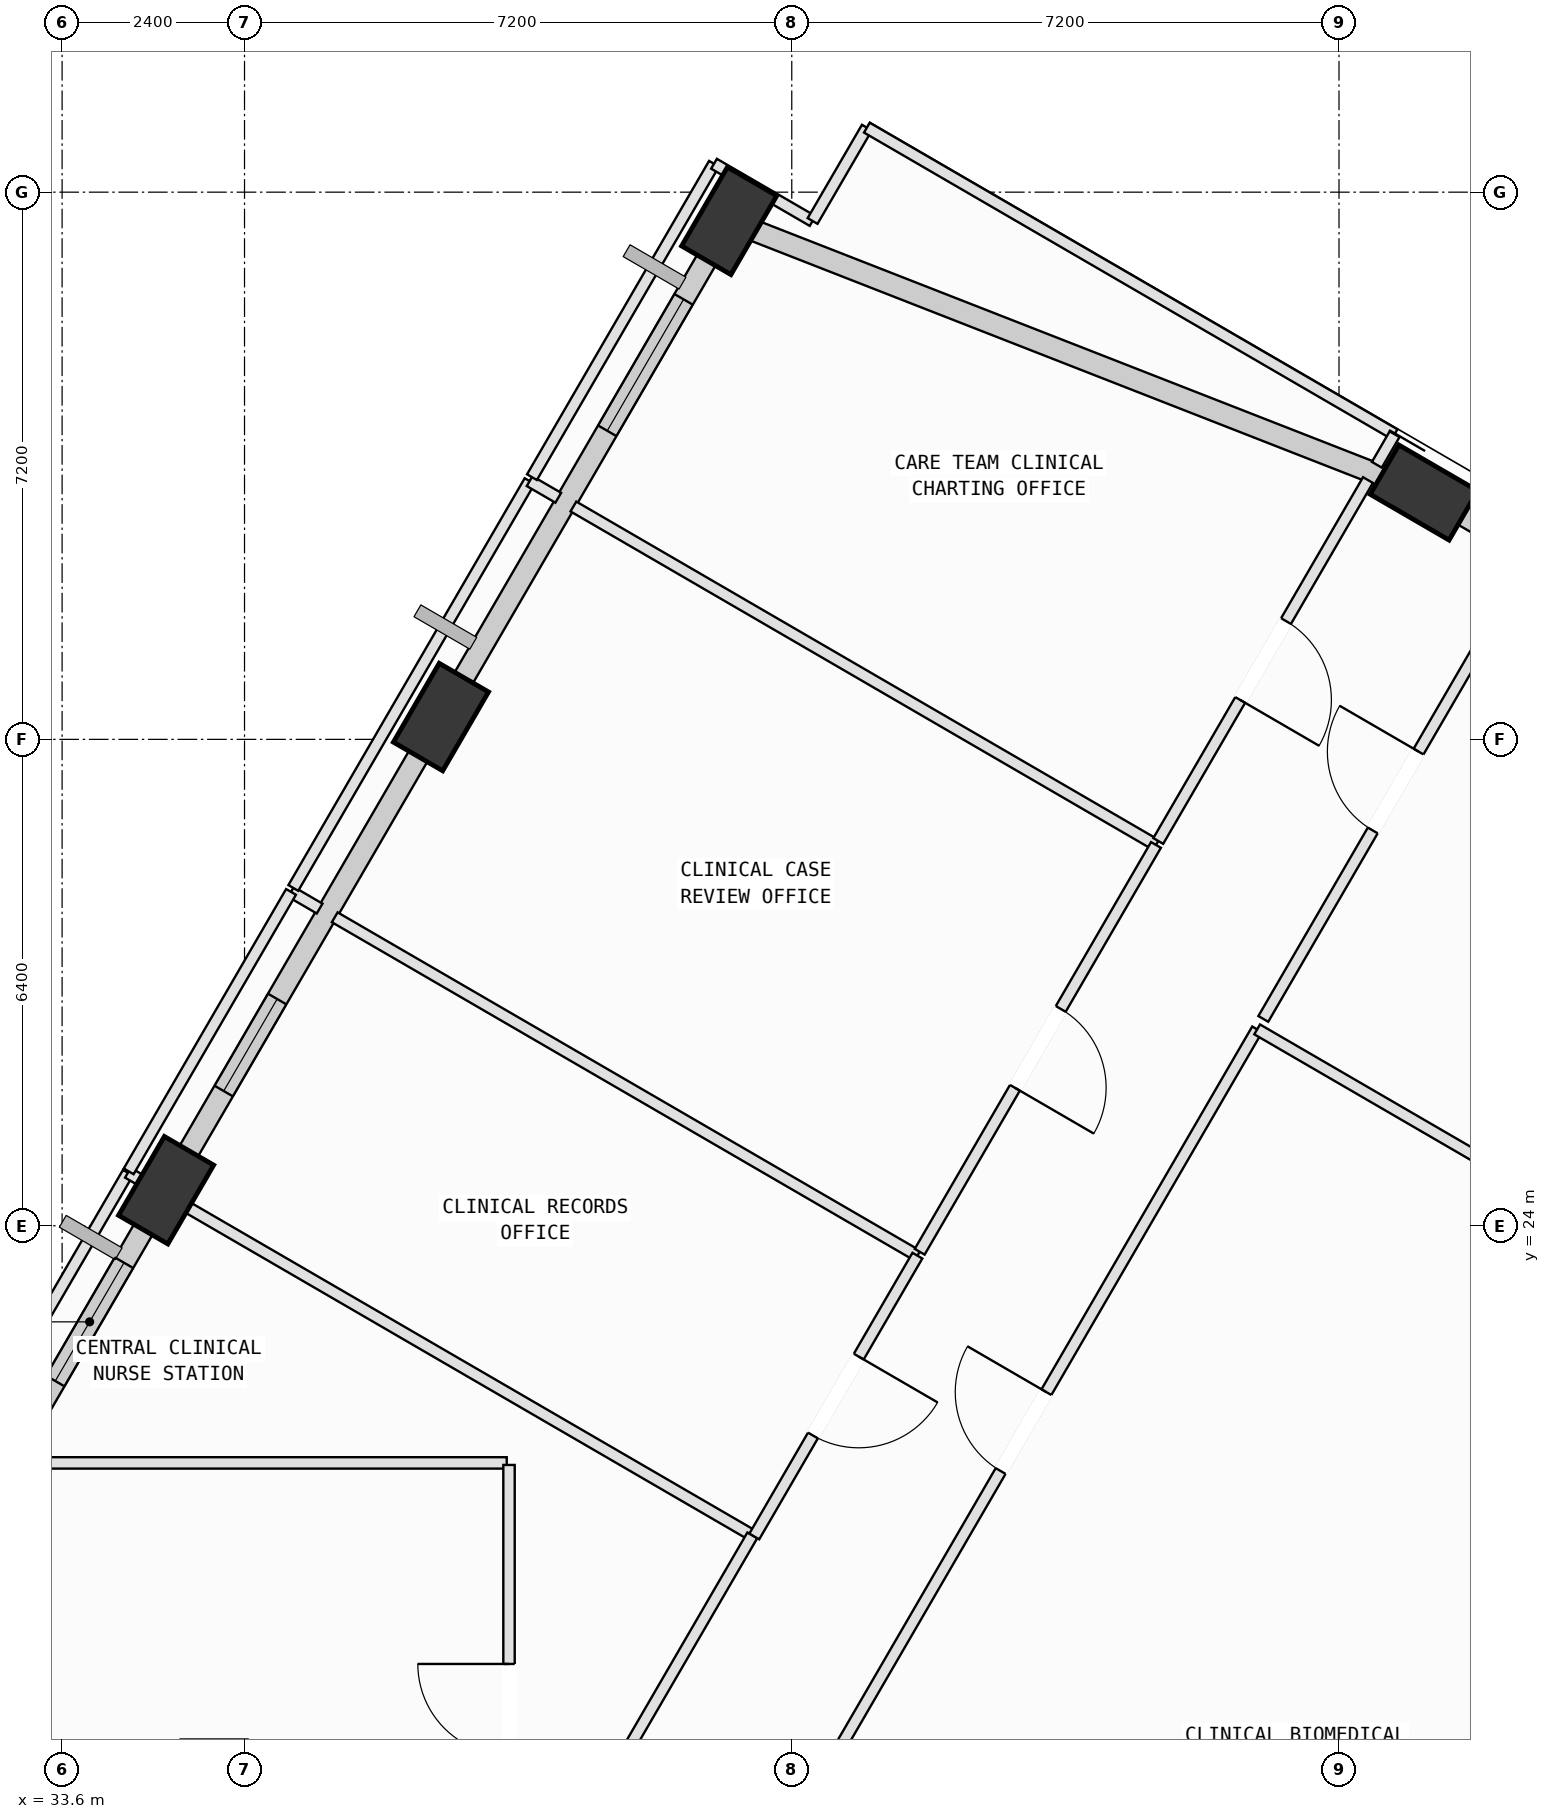
"""IFC4 building model, lengths in metres.
Left out: names, types, materials, properties, quantities, classifications, styles, units other than length and angle.
Written with IfcOpenShell. Run it as: python <this file> out.ifc"""

import sys

from ifc_helpers import new_model, si_unit, direction, frame, frame_2d, origin, origin_2d, place, context, subcontext, project, spatial, rectangle, extrude, element, fill, save


model = new_model("IFC4")
c1 = context("Model", 3, precision=1e-05, world=origin(), true_north=direction((0.0, 1.0)))
c2 = subcontext(c1, "Body", "Model", "MODEL_VIEW")
j1 = project(units=[si_unit("LENGTHUNIT", "METRE"), si_unit("PLANEANGLEUNIT", "RADIAN")], contexts=[c1])
p1 = place(None, origin())
s1 = spatial("IfcSite", under=j1, at=p1, CompositionType="ELEMENT")
p2 = place(p1, origin())
s2 = spatial("IfcBuilding", under=s1, at=p2, CompositionType="ELEMENT")
p3 = place(p2, frame((0.0, 0.0, 280.6)))
s3 = spatial("IfcBuildingStorey", under=s2, at=p3, CompositionType="ELEMENT", Elevation=280.6)
p4 = place(p3, frame((51.518, 33.647, 0.002), z_axis=(-0.037199158282, 0.07372860995, 0.996584323927), x_axis=(0.997490610235, -0.057376614937, 0.041477783832)))
e1 = element("IfcColumn", 1, at=p4, inside=s3, PredefinedType="COLUMN", context=c2, shape_type="SweptSolid", body=[
    extrude(rectangle(XDim=1.2, YDim=0.75, at=origin_2d()), origin(), (0.0, 0.0, 1.0), 4.01),
])
p5 = place(p3, frame((42.377, 37.222, 0.002), z_axis=(-0.051702493642, 0.035911283909, 0.998016649079), x_axis=(0.422270840945, -0.904833829435, 0.054434162054)))
e2 = element("IfcColumn", 2, at=p5, inside=s3, PredefinedType="COLUMN", context=c2, shape_type="SweptSolid", body=[
    extrude(rectangle(XDim=1.2, YDim=0.75, at=origin_2d()), origin(), (0.0, 0.0, 1.0), 4.004),
])
p6 = place(p3, frame((38.584, 30.694, 0.002), z_axis=(-0.02454607751, 0.020455064592, 0.999489409855), x_axis=(0.34240952638, -0.939144474892, 0.027629178856)))
e3 = element("IfcColumn", 3, at=p6, inside=s3, PredefinedType="COLUMN", context=c2, shape_type="SweptSolid", body=[
    extrude(rectangle(XDim=1.2, YDim=0.75, at=origin_2d()), origin(), (0.0, 0.0, 1.0), 3.998),
])
p7 = place(p3, frame((34.968, 24.468, 0.002), z_axis=(0.001343981005, 0.005681374248, 0.999982957706), x_axis=(-0.687834203859, -0.725850275313, 0.005048349202)))
e4 = element("IfcColumn", 4, at=p7, inside=s3, PredefinedType="COLUMN", context=c2, shape_type="SweptSolid", body=[
    extrude(rectangle(XDim=1.2, YDim=0.75, at=origin_2d()), origin(), (0.0, 0.0, 1.0), 3.996),
])
p8 = place(p3, frame((54.944, 17.246, 0.0), z_axis=(0.0, 0.0, 1.0), x_axis=(-0.50227800112, -0.864706198423, 0.0)))
e5 = element("IfcWall", 5, at=p8, inside=s3, PredefinedType="SOLIDWALL", context=c2, shape_type="SweptSolid", body=[
    extrude(rectangle(XDim=6.407, YDim=0.28, at=frame_2d((3.203, 0.0))), origin(), (0.0, 0.0, 1.0), 3.265),
])
p9 = place(p8, frame((2.204, 0.0, 0.75)))
e6 = element("IfcOpeningElement", 6, at=p9, cuts=e5, PredefinedType="OPENING", context=c2, shape_type="SweptSolid", body=[
    extrude(rectangle(XDim=2.0, YDim=1.95, at=frame_2d((1.0, 0.975))), frame((0.0, 0.15, 0.0), z_axis=(0.0, -1.0, 0.0), x_axis=(1.0, 0.0, 0.0)), (0.0, 0.0, 1.0), 0.3),
])
p10 = place(p3, frame((51.732, 33.523, 0.0), z_axis=(0.0, 0.0, 1.0), x_axis=(0.864724875951, -0.502245845091, 0.0)))
e7 = element("IfcWall", 7, at=p10, inside=s3, PredefinedType="SOLIDWALL", context=c2, shape_type="SweptSolid", body=[
    extrude(rectangle(XDim=7.046, YDim=0.28, at=frame_2d((3.523, 0.0))), origin(), (0.0, 0.0, 1.0), 3.265),
])
p11 = place(p3, frame((42.632, 37.123, 0.0), z_axis=(0.0, 0.0, 1.0), x_axis=(0.931312918813, -0.364220053335, 0.0)))
e8 = element("IfcWall", 8, at=p11, inside=s3, PredefinedType="SOLIDWALL", context=c2, shape_type="SweptSolid", body=[
    extrude(rectangle(XDim=9.036, YDim=0.28, at=frame_2d((4.518, 0.0))), origin(), (0.0, 0.0, 1.0), 3.265),
])
p12 = place(p3, frame((38.787, 31.042, 0.0), z_axis=(0.0, 0.0, 1.0), x_axis=(0.502269295317, 0.864711255265, 0.0)))
e9 = element("IfcWall", 9, at=p12, inside=s3, PredefinedType="SOLIDWALL", context=c2, shape_type="SweptSolid", body=[
    extrude(rectangle(XDim=6.78, YDim=0.28, at=frame_2d((3.39, 0.0))), origin(), (0.0, 0.0, 1.0), 3.265),
])
p13 = place(p12, frame((3.953, 0.0, 0.75)))
e10 = element("IfcOpeningElement", 10, at=p13, cuts=e9, PredefinedType="OPENING", context=c2, shape_type="SweptSolid", body=[
    extrude(rectangle(XDim=2.0, YDim=1.95, at=frame_2d((1.0, 0.975))), frame((0.0, 0.15, 0.0), z_axis=(0.0, -1.0, 0.0), x_axis=(1.0, 0.0, 0.0)), (0.0, 0.0, 1.0), 0.3),
])
p14 = place(p3, frame((35.174, 24.821, 0.0), z_axis=(0.0, 0.0, 1.0), x_axis=(0.502271513322, 0.864709966928, 0.0)))
e11 = element("IfcWall", 11, at=p14, inside=s3, PredefinedType="SOLIDWALL", context=c2, shape_type="SweptSolid", body=[
    extrude(rectangle(XDim=6.409, YDim=0.28, at=frame_2d((3.205, 0.0))), origin(), (0.0, 0.0, 1.0), 3.265),
])
p15 = place(p14, frame((1.101, 0.0, 0.75)))
e12 = element("IfcOpeningElement", 12, at=p15, cuts=e11, PredefinedType="OPENING", context=c2, shape_type="SweptSolid", body=[
    extrude(rectangle(XDim=1.4, YDim=1.85, at=frame_2d((0.7, 0.925))), frame((0.0, 0.15, 0.0), z_axis=(0.0, -1.0, 0.0), x_axis=(1.0, 0.0, 0.0)), (0.0, 0.0, 1.0), 0.3),
])
p16 = place(p3, frame((31.681, 18.809, 0.0), z_axis=(0.0, 0.0, 1.0), x_axis=(0.50225314976, 0.864720633243, 0.0)))
e13 = element("IfcWall", 13, at=p16, inside=s3, PredefinedType="SOLIDWALL", context=c2, shape_type="SweptSolid", body=[
    extrude(rectangle(XDim=6.158, YDim=0.28, at=frame_2d((3.079, 0.0))), origin(), (0.0, 0.0, 1.0), 3.265),
])
p17 = place(p16, frame((3.642, 0.0, 0.75)))
e14 = element("IfcOpeningElement", 14, at=p17, cuts=e13, PredefinedType="OPENING", context=c2, shape_type="SweptSolid", body=[
    extrude(rectangle(XDim=1.8, YDim=2.05, at=frame_2d((0.9, 1.025))), frame((0.0, 0.15, 0.0), z_axis=(0.0, -1.0, 0.0), x_axis=(1.0, 0.0, 0.0)), (0.0, 0.0, 1.0), 0.3),
])
p18 = place(p3, frame((43.176, 16.0, 0.0), z_axis=(0.0, 0.0, 1.0), x_axis=(0.502223094905, 0.864738089218, 0.0)))
e15 = element("IfcWall", 15, at=p18, inside=s3, PredefinedType="PARTITIONING", context=c2, shape_type="SweptSolid", body=[
    extrude(rectangle(XDim=12.24, YDim=0.15, at=frame_2d((6.12, 0.0))), origin(), (0.0, 0.0, 1.0), 3.415),
])
p19 = place(p18, frame((5.52, 0.0, 0.0)))
e16 = element("IfcOpeningElement", 16, at=p19, cuts=e15, PredefinedType="OPENING", context=c2, shape_type="SweptSolid", body=[
    extrude(rectangle(XDim=1.2, YDim=2.15, at=frame_2d((0.6, 1.075))), frame((0.0, 0.085, 0.0), z_axis=(0.0, -1.0, 0.0), x_axis=(1.0, 0.0, 0.0)), (0.0, 0.0, 1.0), 0.17),
])
p20 = place(p3, frame((49.323, 26.584, 0.0), z_axis=(0.0, 0.0, 1.0), x_axis=(0.864716809852, -0.502259732369, 0.0)))
e17 = element("IfcWall", 17, at=p20, inside=s3, PredefinedType="PARTITIONING", context=c2, shape_type="SweptSolid", body=[
    extrude(rectangle(XDim=9.435, YDim=0.15, at=frame_2d((4.718, 0.0))), origin(), (0.0, 0.0, 1.0), 3.78),
])
p21 = place(p3, frame((49.404, 26.722, 0.0), z_axis=(0.0, 0.0, 1.0), x_axis=(0.502215346727, 0.864742589163, 0.0)))
e18 = element("IfcWall", 18, at=p21, inside=s3, PredefinedType="PARTITIONING", context=c2, shape_type="SweptSolid", body=[
    extrude(rectangle(XDim=6.935, YDim=0.15, at=frame_2d((3.468, 0.0))), origin(), (0.0, 0.0, 1.0), 3.78),
])
p22 = place(p21, frame((2.867, 0.0, 0.0)))
e19 = element("IfcOpeningElement", 19, at=p22, cuts=e18, PredefinedType="OPENING", context=c2, shape_type="SweptSolid", body=[
    extrude(rectangle(XDim=1.2, YDim=2.15, at=frame_2d((0.6, 1.075))), frame((0.0, 0.085, 0.0), z_axis=(0.0, -1.0, 0.0), x_axis=(1.0, 0.0, 0.0)), (0.0, 0.0, 1.0), 0.17),
])
p23 = place(p3, frame((39.45, 20.88, 0.0), z_axis=(0.0, 0.0, 1.0), x_axis=(-1.0, 0.0, 0.0)))
e20 = element("IfcWall", 20, at=p23, inside=s3, PredefinedType="PARTITIONING", context=c2, shape_type="SweptSolid", body=[
    extrude(rectangle(XDim=6.433, YDim=0.15, at=frame_2d((3.216, 0.0))), origin(), (0.0, 0.0, 1.0), 3.415),
])
p24 = place(p3, frame((32.248, 20.88, 0.0), z_axis=(0.0, 0.0, 1.0), x_axis=(0.502312909272, 0.864685920539, 0.0)))
e21 = element("IfcWall", 21, at=p24, inside=s3, PredefinedType="PARTITIONING", context=c2, shape_type="SweptSolid", body=[
    extrude(rectangle(XDim=4.416, YDim=0.15, at=frame_2d((2.208, 0.0))), origin(), (0.0, 0.0, 1.0), 3.78),
])
p25 = place(p3, frame((34.466, 24.698, 0.0), z_axis=(0.0, 0.0, 1.0), x_axis=(0.864739263201, -0.50222107351, 0.0)))
e22 = element("IfcWall", 22, at=p25, inside=s3, PredefinedType="PARTITIONING", context=c2, shape_type="SweptSolid", body=[
    extrude(rectangle(XDim=9.5, YDim=0.15, at=frame_2d((4.75, 0.0))), origin(), (0.0, 0.0, 1.0), 3.78),
])
p26 = place(p3, frame((42.681, 19.927, 0.0), z_axis=(0.0, 0.0, 1.0), x_axis=(-0.502252880546, -0.86472078961, 0.0)))
e23 = element("IfcWall", 23, at=p26, inside=s3, PredefinedType="PARTITIONING", context=c2, shape_type="SweptSolid", body=[
    extrude(rectangle(XDim=6.373, YDim=0.15, at=frame_2d((3.187, 0.0))), origin(), (0.0, 0.0, 1.0), 3.78),
])
p27 = place(p3, frame((39.48, 14.416, 0.0), z_axis=(0.0, 0.0, 1.0), x_axis=(0.0, 1.0, 0.0)))
e24 = element("IfcWall", 24, at=p27, inside=s3, PredefinedType="PARTITIONING", context=c2, shape_type="SweptSolid", body=[
    extrude(rectangle(XDim=6.437, YDim=0.15, at=frame_2d((3.219, 0.0))), origin(), (0.0, 0.0, 1.0), 3.78),
])
p28 = place(p27, frame((2.618, 0.0, 0.0)))
e25 = element("IfcOpeningElement", 25, at=p28, cuts=e24, PredefinedType="OPENING", context=c2, shape_type="SweptSolid", body=[
    extrude(rectangle(XDim=1.2, YDim=2.15, at=frame_2d((0.6, 1.075))), frame((0.0, 0.085, 0.0), z_axis=(0.0, -1.0, 0.0), x_axis=(1.0, 0.0, 0.0)), (0.0, 0.0, 1.0), 0.17),
])
p29 = place(p3, frame((36.612, 28.393, 0.0), z_axis=(0.0, 0.0, 1.0), x_axis=(0.864104336866, -0.503312720889, 0.0)))
e26 = element("IfcWall", 26, at=p29, inside=s3, PredefinedType="PARTITIONING", context=c2, shape_type="SweptSolid", body=[
    extrude(rectangle(XDim=0.435, YDim=0.15, at=frame_2d((0.218, 0.0))), origin(), (0.0, 0.0, 1.0), 3.78),
])
p30 = place(p3, frame((37.187, 28.059, 0.0), z_axis=(0.0, 0.0, 1.0), x_axis=(0.864744193966, -0.502212583477, 0.0)))
e27 = element("IfcWall", 27, at=p30, inside=s3, PredefinedType="PARTITIONING", context=c2, shape_type="SweptSolid", body=[
    extrude(rectangle(XDim=8.865, YDim=0.15, at=frame_2d((4.433, 0.0))), origin(), (0.0, 0.0, 1.0), 3.78),
])
p31 = place(p3, frame((44.853, 23.607, 0.0), z_axis=(0.0, 0.0, 1.0), x_axis=(-0.502243030772, -0.864726510546, 0.0)))
e28 = element("IfcWall", 28, at=p31, inside=s3, PredefinedType="PARTITIONING", context=c2, shape_type="SweptSolid", body=[
    extrude(rectangle(XDim=4.273, YDim=0.15, at=frame_2d((2.136, 0.0))), origin(), (0.0, 0.0, 1.0), 3.78),
])
p32 = place(p31, frame((1.537, 0.0, 0.0)))
e29 = element("IfcOpeningElement", 29, at=p32, cuts=e28, PredefinedType="OPENING", context=c2, shape_type="SweptSolid", body=[
    extrude(rectangle(XDim=1.2, YDim=2.15, at=frame_2d((0.6, 1.075))), frame((0.0, 0.085, 0.0), z_axis=(0.0, -1.0, 0.0), x_axis=(1.0, 0.0, 0.0)), (0.0, 0.0, 1.0), 0.17),
])
p33 = place(p3, frame((34.476, 24.716, 0.0), z_axis=(0.0, 0.0, 1.0), x_axis=(0.502303099222, 0.864691619314, 0.0)))
e30 = element("IfcWall", 30, at=p33, inside=s3, PredefinedType="PARTITIONING", context=c2, shape_type="SweptSolid", body=[
    extrude(rectangle(XDim=4.252, YDim=0.15, at=frame_2d((2.126, 0.0))), origin(), (0.0, 0.0, 1.0), 3.78),
])
p34 = place(p3, frame((36.642, 28.445, 0.0), z_axis=(0.0, 0.0, 1.0), x_axis=(0.502217339736, 0.864741431683, 0.0)))
e31 = element("IfcWall", 31, at=p34, inside=s3, PredefinedType="PARTITIONING", context=c2, shape_type="SweptSolid", body=[
    extrude(rectangle(XDim=6.19, YDim=0.15, at=frame_2d((3.095, 0.0))), origin(), (0.0, 0.0, 1.0), 3.265),
])
p35 = place(p3, frame((39.751, 33.798, 0.0), z_axis=(0.0, 0.0, 1.0), x_axis=(0.864671253243, -0.502338156838, 0.0)))
e32 = element("IfcWall", 32, at=p35, inside=s3, PredefinedType="PARTITIONING", context=c2, shape_type="SweptSolid", body=[
    extrude(rectangle(XDim=0.436, YDim=0.15, at=frame_2d((0.218, 0.0))), origin(), (0.0, 0.0, 1.0), 3.78),
])
p36 = place(p3, frame((40.327, 33.464, 0.0), z_axis=(0.0, 0.0, 1.0), x_axis=(0.864668557015, -0.502342797807, 0.0)))
e33 = element("IfcWall", 33, at=p36, inside=s3, PredefinedType="PARTITIONING", context=c2, shape_type="SweptSolid", body=[
    extrude(rectangle(XDim=8.865, YDim=0.15, at=frame_2d((4.432, 0.0))), origin(), (0.0, 0.0, 1.0), 3.78),
])
p37 = place(p3, frame((47.992, 29.011, 0.0), z_axis=(0.0, 0.0, 1.0), x_axis=(-0.502217339736, -0.864741431683, 0.0)))
e34 = element("IfcWall", 34, at=p37, inside=s3, PredefinedType="PARTITIONING", context=c2, shape_type="SweptSolid", body=[
    extrude(rectangle(XDim=6.19, YDim=0.15, at=frame_2d((3.095, 0.0))), origin(), (0.0, 0.0, 1.0), 3.78),
])
p38 = place(p37, frame((2.495, 0.0, 0.0)))
e35 = element("IfcOpeningElement", 35, at=p38, cuts=e34, PredefinedType="OPENING", context=c2, shape_type="SweptSolid", body=[
    extrude(rectangle(XDim=1.2, YDim=2.15, at=frame_2d((0.6, 1.075))), frame((0.0, 0.085, 0.0), z_axis=(0.0, -1.0, 0.0), x_axis=(1.0, 0.0, 0.0)), (0.0, 0.0, 1.0), 0.17),
])
p39 = place(p3, frame((39.782, 33.85, 0.0), z_axis=(0.0, 0.0, 1.0), x_axis=(0.50220220608, 0.864750220704, 0.0)))
e36 = element("IfcWall", 36, at=p39, inside=s3, PredefinedType="PARTITIONING", context=c2, shape_type="SweptSolid", body=[
    extrude(rectangle(XDim=4.769, YDim=0.15, at=frame_2d((2.385, 0.0))), origin(), (0.0, 0.0, 1.0), 3.265),
])
p40 = place(p3, frame((42.177, 37.974, 0.0), z_axis=(0.0, 0.0, 1.0), x_axis=(0.864786666582, -0.502139444081, 0.0)))
e37 = element("IfcWall", 37, at=p40, inside=s3, PredefinedType="PARTITIONING", context=c2, shape_type="SweptSolid", body=[
    extrude(rectangle(XDim=1.5, YDim=0.15, at=frame_2d((0.75, 0.0))), origin(), (0.0, 0.0, 1.0), 3.265),
])
p41 = place(p3, frame((43.474, 37.221, 0.0), z_axis=(0.0, 0.0, 1.0), x_axis=(0.502566684229, 0.864538447904, 0.0)))
e38 = element("IfcWall", 38, at=p41, inside=s3, PredefinedType="PARTITIONING", context=c2, shape_type="SweptSolid", body=[
    extrude(rectangle(XDim=1.42, YDim=0.15, at=frame_2d((0.71, 0.0))), origin(), (0.0, 0.0, 1.0), 3.78),
])
p42 = place(p3, frame((44.188, 38.449, 0.0), z_axis=(0.0, 0.0, 1.0), x_axis=(0.864656464367, -0.502363611967, 0.0)))
e39 = element("IfcWall", 39, at=p42, inside=s3, PredefinedType="PARTITIONING", context=c2, shape_type="SweptSolid", body=[
    extrude(rectangle(XDim=8.03, YDim=0.15, at=frame_2d((4.015, 0.0))), origin(), (0.0, 0.0, 1.0), 3.265),
])
p43 = place(p3, frame((51.131, 34.415, 0.0), z_axis=(0.0, 0.0, 1.0), x_axis=(-0.501615897118, -0.865090452935, 0.0)))
e40 = element("IfcWall", 40, at=p43, inside=s3, PredefinedType="PARTITIONING", context=c2, shape_type="SweptSolid", body=[
    extrude(rectangle(XDim=0.465, YDim=0.15, at=frame_2d((0.232, 0.0))), origin(), (0.0, 0.0, 1.0), 3.78),
])
p44 = place(p3, frame((50.781, 33.812, 0.0), z_axis=(0.0, 0.0, 1.0), x_axis=(-0.502344614272, -0.864667501709, 0.0)))
e41 = element("IfcWall", 41, at=p44, inside=s3, PredefinedType="PARTITIONING", context=c2, shape_type="SweptSolid", body=[
    extrude(rectangle(XDim=5.492, YDim=0.15, at=frame_2d((2.746, 0.0))), origin(), (0.0, 0.0, 1.0), 3.78),
])
p45 = place(p44, frame((2.146, 0.0, 0.0)))
e42 = element("IfcOpeningElement", 42, at=p45, cuts=e41, PredefinedType="OPENING", context=c2, shape_type="SweptSolid", body=[
    extrude(rectangle(XDim=1.2, YDim=2.15, at=frame_2d((0.6, 1.075))), frame((0.0, 0.085, 0.0), z_axis=(0.0, -1.0, 0.0), x_axis=(1.0, 0.0, 0.0)), (0.0, 0.0, 1.0), 0.17),
])
p46 = place(p13, origin())
e43 = element("IfcWindow", 43, at=p46, inside=s3, PartitioningType="SINGLE_PANEL", PredefinedType="WINDOW", context=c2, shape_type="SweptSolid", body=[
    extrude(rectangle(XDim=2.0, YDim=1.95, at=frame_2d((1.0, 0.975))), frame((0.0, 0.03, 0.0), z_axis=(0.0, -1.0, 0.0), x_axis=(1.0, 0.0, 0.0)), (0.0, 0.0, 1.0), 0.06),
])
fill(e10, e43)
p47 = place(p15, origin())
e44 = element("IfcWindow", 44, at=p47, inside=s3, PartitioningType="SINGLE_PANEL", PredefinedType="WINDOW", context=c2, shape_type="SweptSolid", body=[
    extrude(rectangle(XDim=1.4, YDim=1.85, at=frame_2d((0.7, 0.925))), frame((0.0, 0.03, 0.0), z_axis=(0.0, -1.0, 0.0), x_axis=(1.0, 0.0, 0.0)), (0.0, 0.0, 1.0), 0.06),
])
fill(e12, e44)
p48 = place(p17, origin())
e45 = element("IfcWindow", 45, at=p48, inside=s3, PartitioningType="SINGLE_PANEL", PredefinedType="WINDOW", context=c2, shape_type="SweptSolid", body=[
    extrude(rectangle(XDim=1.8, YDim=2.05, at=frame_2d((0.9, 1.025))), frame((0.0, 0.03, 0.0), z_axis=(0.0, -1.0, 0.0), x_axis=(1.0, 0.0, 0.0)), (0.0, 0.0, 1.0), 0.06),
])
fill(e14, e45)
p49 = place(p19, origin())
e46 = element("IfcDoor", 46, at=p49, inside=s3, OperationType="SINGLE_SWING_RIGHT", PredefinedType="DOOR", context=c2, shape_type="SweptSolid", body=[
    extrude(rectangle(XDim=1.2, YDim=2.15, at=frame_2d((0.6, 1.075))), frame((0.0, 0.025, 0.0), z_axis=(0.0, -1.0, 0.0), x_axis=(1.0, 0.0, 0.0)), (0.0, 0.0, 1.0), 0.05),
])
fill(e16, e46)
p50 = place(p22, origin())
e47 = element("IfcDoor", 47, at=p50, inside=s3, OperationType="SINGLE_SWING_RIGHT", PredefinedType="DOOR", context=c2, shape_type="SweptSolid", body=[
    extrude(rectangle(XDim=1.2, YDim=2.15, at=frame_2d((0.6, 1.075))), frame((0.0, 0.025, 0.0), z_axis=(0.0, -1.0, 0.0), x_axis=(1.0, 0.0, 0.0)), (0.0, 0.0, 1.0), 0.05),
])
fill(e19, e47)
p51 = place(p28, origin())
e48 = element("IfcDoor", 48, at=p51, inside=s3, OperationType="SINGLE_SWING_RIGHT", PredefinedType="DOOR", context=c2, shape_type="SweptSolid", body=[
    extrude(rectangle(XDim=1.2, YDim=2.15, at=frame_2d((0.6, 1.075))), frame((0.0, 0.025, 0.0), z_axis=(0.0, -1.0, 0.0), x_axis=(1.0, 0.0, 0.0)), (0.0, 0.0, 1.0), 0.05),
])
fill(e25, e48)
p52 = place(p32, origin())
e49 = element("IfcDoor", 49, at=p52, inside=s3, OperationType="SINGLE_SWING_LEFT", PredefinedType="DOOR", context=c2, shape_type="SweptSolid", body=[
    extrude(rectangle(XDim=1.2, YDim=2.15, at=frame_2d((0.6, 1.075))), frame((0.0, 0.025, 0.0), z_axis=(0.0, -1.0, 0.0), x_axis=(1.0, 0.0, 0.0)), (0.0, 0.0, 1.0), 0.05),
])
fill(e29, e49)
p53 = place(p38, origin())
e50 = element("IfcDoor", 50, at=p53, inside=s3, OperationType="SINGLE_SWING_RIGHT", PredefinedType="DOOR", context=c2, shape_type="SweptSolid", body=[
    extrude(rectangle(XDim=1.2, YDim=2.15, at=frame_2d((0.6, 1.075))), frame((0.0, 0.025, 0.0), z_axis=(0.0, -1.0, 0.0), x_axis=(1.0, 0.0, 0.0)), (0.0, 0.0, 1.0), 0.05),
])
fill(e35, e50)
p54 = place(p45, origin())
e51 = element("IfcDoor", 51, at=p54, inside=s3, OperationType="SINGLE_SWING_RIGHT", PredefinedType="DOOR", context=c2, shape_type="SweptSolid", body=[
    extrude(rectangle(XDim=1.2, YDim=2.15, at=frame_2d((0.6, 1.075))), frame((0.0, 0.025, 0.0), z_axis=(0.0, -1.0, 0.0), x_axis=(1.0, 0.0, 0.0)), (0.0, 0.0, 1.0), 0.05),
])
fill(e42, e51)
save(model, sys.argv[1])
